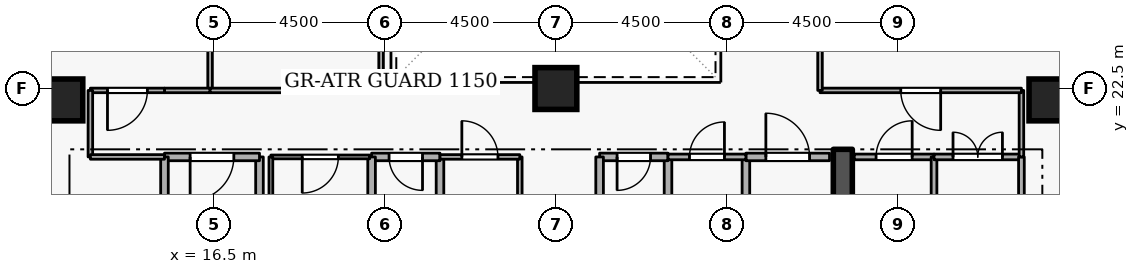
"""IFC4 building model, lengths in metres.
Left out: names, types, materials, properties, quantities, classifications, styles, units other than length and angle.
Written with IfcOpenShell. Run it as: python <this file> out.ifc"""

import sys

from ifc_helpers import new_model, si_unit, direction, frame, frame_2d, origin, origin_2d, place, context, subcontext, project, spatial, rectangle, extrude, element, fill, save


model = new_model("IFC4")
c1 = context("Model", 3, precision=1e-05, world=origin(), true_north=direction((0.0, 1.0)))
c2 = subcontext(c1, "Body", "Model", "MODEL_VIEW")
j1 = project(units=[si_unit("LENGTHUNIT", "METRE"), si_unit("PLANEANGLEUNIT", "RADIAN")], contexts=[c1])
p1 = place(None, origin())
s1 = spatial("IfcSite", under=j1, at=p1, CompositionType="ELEMENT")
p2 = place(p1, origin())
s2 = spatial("IfcBuilding", under=s1, at=p2, CompositionType="ELEMENT")
p3 = place(p2, frame((0.0, 0.0, 159.9)))
s3 = spatial("IfcBuildingStorey", under=s2, at=p3, CompositionType="ELEMENT", Elevation=159.9)
p4 = place(p3, frame((33.05, 15.1, 0.0), z_axis=(0.0, 0.0, 1.0), x_axis=(0.0, 1.0, 0.0)))
e1 = element("IfcWall", 1, at=p4, inside=s3, PredefinedType="SHEAR", context=c2, shape_type="SweptSolid", body=[
    extrude(rectangle(XDim=5.8, YDim=0.5, at=frame_2d((2.9, 0.0))), origin(), (0.0, 0.0, 1.0), 3.6),
])
for number, where, z_axis, x_axis in (
    (2, (12.5, 22.2, 0.0), (0.0, 0.0, 1.0), (1.0, 0.0, 0.0)),
    (3, (38.5, 22.2, 0.0), (0.0, 0.0, 1.0), (1.0, 0.0, 0.0)),
    (4, (25.5, 22.5, 0.0), (0.0, 0.0, 1.0), (1.0, 0.0, 0.0)),
):
    element("IfcColumn", number, at=place(p3, frame(where, z_axis=z_axis, x_axis=x_axis)), inside=s3, PredefinedType="COLUMN", context=c2, shape_type="SweptSolid", body=[
        extrude(rectangle(XDim=1.1, YDim=1.1, at=origin_2d()), origin(), (0.0, 0.0, 1.0), 3.6),
    ])
p5 = place(p3, frame((17.7, 18.4, 0.0), z_axis=(0.0, 0.0, 1.0), x_axis=(0.0, 1.0, 0.0)))
e5 = element("IfcWall", 5, at=p5, inside=s3, PredefinedType="STANDARD", context=c2, shape_type="SweptSolid", body=[
    extrude(rectangle(XDim=2.3, YDim=0.2, at=frame_2d((1.15, 0.0))), origin(), (0.0, 0.0, 1.0), 2.545),
])
p6 = place(p3, frame((17.7, 20.7, 0.0), z_axis=(0.0, 0.0, 1.0), x_axis=(-1.0, 0.0, 0.0)))
e6 = element("IfcWall", 6, at=p6, inside=s3, PredefinedType="STANDARD", context=c2, shape_type="SweptSolid", body=[
    extrude(rectangle(XDim=2.5, YDim=0.2, at=frame_2d((1.25, 0.0))), origin(), (0.0, 0.0, 1.0), 3.34),
])
p7 = place(p6, frame((0.675, 0.0, 0.0)))
e7 = element("IfcOpeningElement", 7, at=p7, cuts=e6, PredefinedType="OPENING", context=c2, shape_type="SweptSolid", body=[
    extrude(rectangle(XDim=1.15, YDim=2.1, at=frame_2d((0.575, 1.05))), frame((0.0, 0.11, 0.0), z_axis=(0.0, -1.0, 0.0), x_axis=(1.0, 0.0, 0.0)), (0.0, 0.0, 1.0), 0.22),
])
p8 = place(p3, frame((15.2, 20.7, 0.0), z_axis=(0.0, 0.0, 1.0), x_axis=(0.0, -1.0, 0.0)))
e8 = element("IfcWall", 8, at=p8, inside=s3, PredefinedType="STANDARD", context=c2, shape_type="SweptSolid", body=[
    extrude(rectangle(XDim=5.7, YDim=0.2, at=frame_2d((2.85, 0.0))), origin(), (0.0, 0.0, 1.0), 3.34),
])
p9 = place(p3, frame((28.45, 18.65, 0.0), z_axis=(0.0, 0.0, 1.0), x_axis=(0.0, 1.0, 0.0)))
e9 = element("IfcWall", 9, at=p9, inside=s3, PredefinedType="STANDARD", context=c2, shape_type="SweptSolid", body=[
    extrude(rectangle(XDim=2.05, YDim=0.2, at=frame_2d((1.025, 0.0))), origin(), (0.0, 0.0, 1.0), 3.34),
])
p10 = place(p3, frame((28.45, 20.7, 0.0), z_axis=(0.0, 0.0, 1.0), x_axis=(-1.0, 0.0, 0.0)))
e10 = element("IfcWall", 10, at=p10, inside=s3, PredefinedType="STANDARD", context=c2, shape_type="SweptSolid", body=[
    extrude(rectangle(XDim=1.8, YDim=0.2, at=frame_2d((0.9, 0.0))), origin(), (0.0, 0.0, 1.0), 3.34),
])
p11 = place(p10, frame((0.46, 0.0, 0.0)))
e11 = element("IfcOpeningElement", 11, at=p11, cuts=e10, PredefinedType="OPENING", context=c2, shape_type="SweptSolid", body=[
    extrude(rectangle(XDim=0.88, YDim=2.04, at=frame_2d((0.44, 1.02))), frame((0.0, 0.11, 0.0), z_axis=(0.0, -1.0, 0.0), x_axis=(1.0, 0.0, 0.0)), (0.0, 0.0, 1.0), 0.22),
])
for number, where, z_axis, x_axis in (
    (12, (26.65, 20.7, 0.0), (0.0, 0.0, 1.0), (0.0, -1.0, 0.0)),
    (13, (22.45, 18.65, 0.0), (0.0, 0.0, 1.0), (0.0, 1.0, 0.0)),
):
    element("IfcWall", number, at=place(p3, frame(where, z_axis=z_axis, x_axis=x_axis)), inside=s3, PredefinedType="STANDARD", context=c2, shape_type="SweptSolid", body=[
        extrude(rectangle(XDim=2.05, YDim=0.2, at=frame_2d((1.025, 0.0))), origin(), (0.0, 0.0, 1.0), 3.34),
    ])
p12 = place(p3, frame((22.45, 20.7, 0.0), z_axis=(0.0, 0.0, 1.0), x_axis=(-1.0, 0.0, 0.0)))
e14 = element("IfcWall", 14, at=p12, inside=s3, PredefinedType="STANDARD", context=c2, shape_type="SweptSolid", body=[
    extrude(rectangle(XDim=1.8, YDim=0.2, at=frame_2d((0.9, 0.0))), origin(), (0.0, 0.0, 1.0), 3.34),
])
p13 = place(p12, frame((0.46, 0.0, 0.0)))
e15 = element("IfcOpeningElement", 15, at=p13, cuts=e14, PredefinedType="OPENING", context=c2, shape_type="SweptSolid", body=[
    extrude(rectangle(XDim=0.88, YDim=2.04, at=frame_2d((0.44, 1.02))), frame((0.0, 0.11, 0.0), z_axis=(0.0, -1.0, 0.0), x_axis=(1.0, 0.0, 0.0)), (0.0, 0.0, 1.0), 0.22),
])
for number, where, z_axis, x_axis in (
    (16, (20.65, 20.7, 0.0), (0.0, 0.0, 1.0), (0.0, -1.0, 0.0)),
    (17, (30.5, 18.65, 0.0), (0.0, 0.0, 1.0), (0.0, 1.0, 0.0)),
):
    element("IfcWall", number, at=place(p3, frame(where, z_axis=z_axis, x_axis=x_axis)), inside=s3, PredefinedType="STANDARD", context=c2, shape_type="SweptSolid", body=[
        extrude(rectangle(XDim=2.05, YDim=0.2, at=frame_2d((1.025, 0.0))), origin(), (0.0, 0.0, 1.0), 3.34),
    ])
p14 = place(p3, frame((30.5, 20.7, 0.0), z_axis=(0.0, 0.0, 1.0), x_axis=(1.0, 0.0, 0.0)))
e18 = element("IfcWall", 18, at=p14, inside=s3, PredefinedType="STANDARD", context=c2, shape_type="SweptSolid", body=[
    extrude(rectangle(XDim=2.2, YDim=0.2, at=frame_2d((1.1, 0.0))), origin(), (0.0, 0.0, 1.0), 3.34),
])
p15 = place(p14, frame((0.525, 0.0, 0.0)))
e19 = element("IfcOpeningElement", 19, at=p15, cuts=e18, PredefinedType="OPENING", context=c2, shape_type="SweptSolid", body=[
    extrude(rectangle(XDim=1.15, YDim=2.1, at=frame_2d((0.575, 1.05))), frame((0.0, 0.11, 0.0), z_axis=(0.0, -1.0, 0.0), x_axis=(1.0, 0.0, 0.0)), (0.0, 0.0, 1.0), 0.22),
])
p16 = place(p3, frame((20.6, 20.7, 0.0), z_axis=(0.0, 0.0, 1.0), x_axis=(-1.0, 0.0, 0.0)))
e20 = element("IfcWall", 20, at=p16, inside=s3, PredefinedType="PARTITIONING", context=c2, shape_type="SweptSolid", body=[
    extrude(rectangle(XDim=2.6, YDim=0.1, at=frame_2d((1.3, 0.0))), origin(), (0.0, 0.0, 1.0), 3.34),
])
p17 = place(p16, frame((0.825, 0.0, 0.0)))
e21 = element("IfcOpeningElement", 21, at=p17, cuts=e20, PredefinedType="OPENING", context=c2, shape_type="SweptSolid", body=[
    extrude(rectangle(XDim=0.95, YDim=2.1, at=frame_2d((0.475, 1.05))), frame((0.0, 0.06, 0.0), z_axis=(0.0, -1.0, 0.0), x_axis=(1.0, 0.0, 0.0)), (0.0, 0.0, 1.0), 0.12),
])
p18 = place(p3, frame((18.0, 20.7, 0.0), z_axis=(0.0, 0.0, 1.0), x_axis=(0.0, -1.0, 0.0)))
e22 = element("IfcWall", 22, at=p18, inside=s3, PredefinedType="PARTITIONING", context=c2, shape_type="SweptSolid", body=[
    extrude(rectangle(XDim=2.05, YDim=0.1, at=frame_2d((1.025, 0.0))), origin(), (0.0, 0.0, 1.0), 2.545),
])
p19 = place(p3, frame((24.55, 20.7, 0.0), z_axis=(0.0, 0.0, 1.0), x_axis=(0.0, -1.0, 0.0)))
e23 = element("IfcWall", 23, at=p19, inside=s3, PredefinedType="PARTITIONING", context=c2, shape_type="SweptSolid", body=[
    extrude(rectangle(XDim=2.05, YDim=0.12, at=frame_2d((1.025, 0.0))), origin(), (0.0, 0.0, 1.0), 3.34),
])
p20 = place(p3, frame((22.45, 20.7, 0.0), z_axis=(0.0, 0.0, 1.0), x_axis=(1.0, 0.0, 0.0)))
e24 = element("IfcWall", 24, at=p20, inside=s3, PredefinedType="PARTITIONING", context=c2, shape_type="SweptSolid", body=[
    extrude(rectangle(XDim=2.1, YDim=0.12, at=frame_2d((1.05, 0.0))), origin(), (0.0, 0.0, 1.0), 3.34),
])
p21 = place(p20, frame((0.575, 0.0, 0.0)))
e25 = element("IfcOpeningElement", 25, at=p21, cuts=e24, PredefinedType="OPENING", context=c2, shape_type="SweptSolid", body=[
    extrude(rectangle(XDim=0.95, YDim=2.1, at=frame_2d((0.475, 1.05))), frame((0.0, 0.07, 0.0), z_axis=(0.0, -1.0, 0.0), x_axis=(1.0, 0.0, 0.0)), (0.0, 0.0, 1.0), 0.14),
])
p22 = place(p3, frame((28.45, 20.7, 0.0), z_axis=(0.0, 0.0, 1.0), x_axis=(1.0, 0.0, 0.0)))
e26 = element("IfcWall", 26, at=p22, inside=s3, PredefinedType="PARTITIONING", context=c2, shape_type="SweptSolid", body=[
    extrude(rectangle(XDim=2.05, YDim=0.15, at=frame_2d((1.025, 0.0))), origin(), (0.0, 0.0, 1.0), 3.34),
])
p23 = place(p22, frame((0.565, 0.0, 0.0)))
e27 = element("IfcOpeningElement", 27, at=p23, cuts=e26, PredefinedType="OPENING", context=c2, shape_type="SweptSolid", body=[
    extrude(rectangle(XDim=0.92, YDim=2.08, at=frame_2d((0.46, 1.04))), frame((0.0, 0.085, 0.0), z_axis=(0.0, -1.0, 0.0), x_axis=(1.0, 0.0, 0.0)), (0.0, 0.0, 1.0), 0.17),
])
p24 = place(p3, frame((33.35, 20.7, 0.0), z_axis=(0.0, 0.0, 1.0), x_axis=(1.0, 0.0, 0.0)))
e28 = element("IfcWall", 28, at=p24, inside=s3, PredefinedType="PARTITIONING", context=c2, shape_type="SweptSolid", body=[
    extrude(rectangle(XDim=2.1, YDim=0.15, at=frame_2d((1.05, 0.0))), origin(), (0.0, 0.0, 1.0), 3.34),
])
p25 = place(p24, frame((0.575, 0.0, 0.0)))
e29 = element("IfcOpeningElement", 29, at=p25, cuts=e28, PredefinedType="OPENING", context=c2, shape_type="SweptSolid", body=[
    extrude(rectangle(XDim=0.95, YDim=2.1, at=frame_2d((0.475, 1.05))), frame((0.0, 0.085, 0.0), z_axis=(0.0, -1.0, 0.0), x_axis=(1.0, 0.0, 0.0)), (0.0, 0.0, 1.0), 0.17),
])
p26 = place(p3, frame((35.45, 20.7, 0.0), z_axis=(0.0, 0.0, 1.0), x_axis=(0.0, -1.0, 0.0)))
e30 = element("IfcWall", 30, at=p26, inside=s3, PredefinedType="PARTITIONING", context=c2, shape_type="SweptSolid", body=[
    extrude(rectangle(XDim=5.65, YDim=0.15, at=frame_2d((2.825, 0.0))), origin(), (0.0, 0.0, 1.0), 3.34),
])
p27 = place(p3, frame((35.45, 20.7, 0.0), z_axis=(0.0, 0.0, 1.0), x_axis=(1.0, 0.0, 0.0)))
e31 = element("IfcWall", 31, at=p27, inside=s3, PredefinedType="PARTITIONING", context=c2, shape_type="SweptSolid", body=[
    extrude(rectangle(XDim=2.3, YDim=0.15, at=frame_2d((1.15, 0.0))), origin(), (0.0, 0.0, 1.0), 3.34),
])
p28 = place(p27, frame((0.5, 0.0, 0.0)))
e32 = element("IfcOpeningElement", 32, at=p28, cuts=e31, PredefinedType="OPENING", context=c2, shape_type="SweptSolid", body=[
    extrude(rectangle(XDim=1.3, YDim=2.12, at=frame_2d((0.65, 1.06))), frame((0.0, 0.085, 0.0), z_axis=(0.0, -1.0, 0.0), x_axis=(1.0, 0.0, 0.0)), (0.0, 0.0, 1.0), 0.17),
])
p29 = place(p3, frame((37.75, 20.7, 0.0), z_axis=(0.0, 0.0, 1.0), x_axis=(0.0, -1.0, 0.0)))
e33 = element("IfcWall", 33, at=p29, inside=s3, PredefinedType="PARTITIONING", context=c2, shape_type="SweptSolid", body=[
    extrude(rectangle(XDim=5.65, YDim=0.15, at=frame_2d((2.825, 0.0))), origin(), (0.0, 0.0, 1.0), 3.34),
])
p30 = place(p3, frame((16.4, 27.0, 0.0), z_axis=(0.0, 0.0, 1.0), x_axis=(0.0, -1.0, 0.0)))
e34 = element("IfcWall", 34, at=p30, inside=s3, PredefinedType="PARTITIONING", context=c2, shape_type="SweptSolid", body=[
    extrude(rectangle(XDim=4.55, YDim=0.12, at=frame_2d((2.275, 0.0))), origin(), (0.0, 0.0, 1.0), 3.34),
])
p31 = place(p3, frame((16.4, 22.45, 0.0), z_axis=(0.0, 0.0, 1.0), x_axis=(-1.0, 0.0, 0.0)))
e35 = element("IfcWall", 35, at=p31, inside=s3, PredefinedType="PARTITIONING", context=c2, shape_type="SweptSolid", body=[
    extrude(rectangle(XDim=1.2, YDim=0.12, at=frame_2d((0.6, 0.0))), origin(), (0.0, 0.0, 1.0), 3.34),
])
p32 = place(p3, frame((15.2, 22.45, 0.0), z_axis=(0.0, 0.0, 1.0), x_axis=(-1.0, 0.0, 0.0)))
e36 = element("IfcWall", 36, at=p32, inside=s3, PredefinedType="PARTITIONING", context=c2, shape_type="SweptSolid", body=[
    extrude(rectangle(XDim=1.95, YDim=0.12, at=frame_2d((0.975, 0.0))), origin(), (0.0, 0.0, 1.0), 3.34),
])
p33 = place(p32, frame((0.45, 0.0, 0.0)))
e37 = element("IfcOpeningElement", 37, at=p33, cuts=e36, PredefinedType="OPENING", context=c2, shape_type="SweptSolid", body=[
    extrude(rectangle(XDim=1.05, YDim=2.1, at=frame_2d((0.525, 1.05))), frame((0.0, 0.07, 0.0), z_axis=(0.0, -1.0, 0.0), x_axis=(1.0, 0.0, 0.0)), (0.0, 0.0, 1.0), 0.14),
])
p34 = place(p3, frame((13.25, 22.45, 0.0), z_axis=(0.0, 0.0, 1.0), x_axis=(0.0, -1.0, 0.0)))
e38 = element("IfcWall", 38, at=p34, inside=s3, PredefinedType="PARTITIONING", context=c2, shape_type="SweptSolid", body=[
    extrude(rectangle(XDim=1.75, YDim=0.12, at=frame_2d((0.875, 0.0))), origin(), (0.0, 0.0, 1.0), 3.34),
])
p35 = place(p3, frame((13.25, 20.7, 0.0), z_axis=(0.0, 0.0, 1.0), x_axis=(1.0, 0.0, 0.0)))
e39 = element("IfcWall", 39, at=p35, inside=s3, PredefinedType="PARTITIONING", context=c2, shape_type="SweptSolid", body=[
    extrude(rectangle(XDim=1.95, YDim=0.12, at=frame_2d((0.975, 0.0))), origin(), (0.0, 0.0, 1.0), 3.34),
])
p36 = place(p3, frame((20.9, 31.55, 0.0), z_axis=(0.0, 0.0, 1.0), x_axis=(0.0, -1.0, 0.0)))
e40 = element("IfcWall", 40, at=p36, inside=s3, PredefinedType="PARTITIONING", context=c2, shape_type="SweptSolid", body=[
    extrude(rectangle(XDim=9.1, YDim=0.12, at=frame_2d((4.55, 0.0))), origin(), (0.0, 0.0, 1.0), 3.34),
])
p37 = place(p3, frame((20.9, 22.45, 0.0), z_axis=(0.0, 0.0, 1.0), x_axis=(-1.0, 0.0, 0.0)))
e41 = element("IfcWall", 41, at=p37, inside=s3, PredefinedType="PARTITIONING", context=c2, shape_type="SweptSolid", body=[
    extrude(rectangle(XDim=4.5, YDim=0.12, at=frame_2d((2.25, 0.0))), origin(), (0.0, 0.0, 1.0), 3.34),
])
p38 = place(p3, frame((37.75, 20.7, 0.0), z_axis=(0.0, 0.0, 1.0), x_axis=(0.0, 1.0, 0.0)))
e42 = element("IfcWall", 42, at=p38, inside=s3, PredefinedType="PARTITIONING", context=c2, shape_type="SweptSolid", body=[
    extrude(rectangle(XDim=1.75, YDim=0.12, at=frame_2d((0.875, 0.0))), origin(), (0.0, 0.0, 1.0), 3.34),
])
p39 = place(p3, frame((37.75, 22.45, 0.0), z_axis=(0.0, 0.0, 1.0), x_axis=(-1.0, 0.0, 0.0)))
e43 = element("IfcWall", 43, at=p39, inside=s3, PredefinedType="PARTITIONING", context=c2, shape_type="SweptSolid", body=[
    extrude(rectangle(XDim=5.3, YDim=0.12, at=frame_2d((2.65, 0.0))), origin(), (0.0, 0.0, 1.0), 3.34),
])
p40 = place(p39, frame((2.125, 0.0, 0.0)))
e44 = element("IfcOpeningElement", 44, at=p40, cuts=e43, PredefinedType="OPENING", context=c2, shape_type="SweptSolid", body=[
    extrude(rectangle(XDim=1.05, YDim=2.1, at=frame_2d((0.525, 1.05))), frame((0.0, 0.07, 0.0), z_axis=(0.0, -1.0, 0.0), x_axis=(1.0, 0.0, 0.0)), (0.0, 0.0, 1.0), 0.14),
])
p41 = place(p3, frame((32.45, 22.45, 0.0), z_axis=(0.0, 0.0, 1.0), x_axis=(0.0, 1.0, 0.0)))
e45 = element("IfcWall", 45, at=p41, inside=s3, PredefinedType="PARTITIONING", context=c2, shape_type="SweptSolid", body=[
    extrude(rectangle(XDim=2.95, YDim=0.12, at=frame_2d((1.475, 0.0))), origin(), (0.0, 0.0, 1.0), 3.34),
])
p42 = place(p7, origin())
e46 = element("IfcDoor", 46, at=p42, inside=s3, OperationType="SINGLE_SWING_RIGHT", PredefinedType="DOOR", context=c2, shape_type="SweptSolid", body=[
    extrude(rectangle(XDim=1.15, YDim=2.1, at=frame_2d((0.575, 1.05))), frame((0.0, 0.025, 0.0), z_axis=(0.0, -1.0, 0.0), x_axis=(1.0, 0.0, 0.0)), (0.0, 0.0, 1.0), 0.05),
])
fill(e7, e46)
p43 = place(p11, origin())
e47 = element("IfcDoor", 47, at=p43, inside=s3, OperationType="SINGLE_SWING_RIGHT", PredefinedType="DOOR", context=c2, shape_type="SweptSolid", body=[
    extrude(rectangle(XDim=0.88, YDim=2.04, at=frame_2d((0.44, 1.02))), frame((0.0, 0.025, 0.0), z_axis=(0.0, -1.0, 0.0), x_axis=(1.0, 0.0, 0.0)), (0.0, 0.0, 1.0), 0.05),
])
fill(e11, e47)
p44 = place(p13, origin())
e48 = element("IfcDoor", 48, at=p44, inside=s3, OperationType="SINGLE_SWING_LEFT", PredefinedType="DOOR", context=c2, shape_type="SweptSolid", body=[
    extrude(rectangle(XDim=0.88, YDim=2.04, at=frame_2d((0.44, 1.02))), frame((0.0, 0.025, 0.0), z_axis=(0.0, -1.0, 0.0), x_axis=(1.0, 0.0, 0.0)), (0.0, 0.0, 1.0), 0.05),
])
fill(e15, e48)
p45 = place(p17, origin())
e49 = element("IfcDoor", 49, at=p45, inside=s3, OperationType="SINGLE_SWING_RIGHT", PredefinedType="DOOR", context=c2, shape_type="SweptSolid", body=[
    extrude(rectangle(XDim=0.95, YDim=2.1, at=frame_2d((0.475, 1.05))), frame((0.0, 0.025, 0.0), z_axis=(0.0, -1.0, 0.0), x_axis=(1.0, 0.0, 0.0)), (0.0, 0.0, 1.0), 0.05),
])
fill(e21, e49)
p46 = place(p21, origin())
e50 = element("IfcDoor", 50, at=p46, inside=s3, OperationType="SINGLE_SWING_LEFT", PredefinedType="DOOR", context=c2, shape_type="SweptSolid", body=[
    extrude(rectangle(XDim=0.95, YDim=2.1, at=frame_2d((0.475, 1.05))), frame((0.0, 0.025, 0.0), z_axis=(0.0, -1.0, 0.0), x_axis=(1.0, 0.0, 0.0)), (0.0, 0.0, 1.0), 0.05),
])
fill(e25, e50)
p47 = place(p23, origin())
e51 = element("IfcDoor", 51, at=p47, inside=s3, OperationType="SINGLE_SWING_RIGHT", PredefinedType="DOOR", context=c2, shape_type="SweptSolid", body=[
    extrude(rectangle(XDim=0.92, YDim=2.08, at=frame_2d((0.46, 1.04))), frame((0.0, 0.025, 0.0), z_axis=(0.0, -1.0, 0.0), x_axis=(1.0, 0.0, 0.0)), (0.0, 0.0, 1.0), 0.05),
])
fill(e27, e51)
p48 = place(p15, origin())
e52 = element("IfcDoor", 52, at=p48, inside=s3, OperationType="SINGLE_SWING_LEFT", PredefinedType="DOOR", context=c2, shape_type="SweptSolid", body=[
    extrude(rectangle(XDim=1.15, YDim=2.1, at=frame_2d((0.575, 1.05))), frame((0.0, 0.025, 0.0), z_axis=(0.0, -1.0, 0.0), x_axis=(1.0, 0.0, 0.0)), (0.0, 0.0, 1.0), 0.05),
])
fill(e19, e52)
p49 = place(p25, origin())
e53 = element("IfcDoor", 53, at=p49, inside=s3, OperationType="SINGLE_SWING_RIGHT", PredefinedType="DOOR", context=c2, shape_type="SweptSolid", body=[
    extrude(rectangle(XDim=0.95, YDim=2.1, at=frame_2d((0.475, 1.05))), frame((0.0, 0.025, 0.0), z_axis=(0.0, -1.0, 0.0), x_axis=(1.0, 0.0, 0.0)), (0.0, 0.0, 1.0), 0.05),
])
fill(e29, e53)
p50 = place(p28, origin())
e54 = element("IfcDoor", 54, at=p50, inside=s3, OperationType="DOUBLE_DOOR_SINGLE_SWING", PredefinedType="DOOR", context=c2, shape_type="SweptSolid", body=[
    extrude(rectangle(XDim=1.3, YDim=2.12, at=frame_2d((0.65, 1.06))), frame((0.0, 0.025, 0.0), z_axis=(0.0, -1.0, 0.0), x_axis=(1.0, 0.0, 0.0)), (0.0, 0.0, 1.0), 0.05),
])
fill(e32, e54)
p51 = place(p33, origin())
e55 = element("IfcDoor", 55, at=p51, inside=s3, OperationType="SINGLE_SWING_RIGHT", PredefinedType="DOOR", context=c2, shape_type="SweptSolid", body=[
    extrude(rectangle(XDim=1.05, YDim=2.1, at=frame_2d((0.525, 1.05))), frame((0.0, 0.025, 0.0), z_axis=(0.0, -1.0, 0.0), x_axis=(1.0, 0.0, 0.0)), (0.0, 0.0, 1.0), 0.05),
])
fill(e37, e55)
p52 = place(p40, origin())
e56 = element("IfcDoor", 56, at=p52, inside=s3, OperationType="SINGLE_SWING_LEFT", PredefinedType="DOOR", context=c2, shape_type="SweptSolid", body=[
    extrude(rectangle(XDim=1.05, YDim=2.1, at=frame_2d((0.525, 1.05))), frame((0.0, 0.025, 0.0), z_axis=(0.0, -1.0, 0.0), x_axis=(1.0, 0.0, 0.0)), (0.0, 0.0, 1.0), 0.05),
])
fill(e44, e56)
save(model, sys.argv[1])
